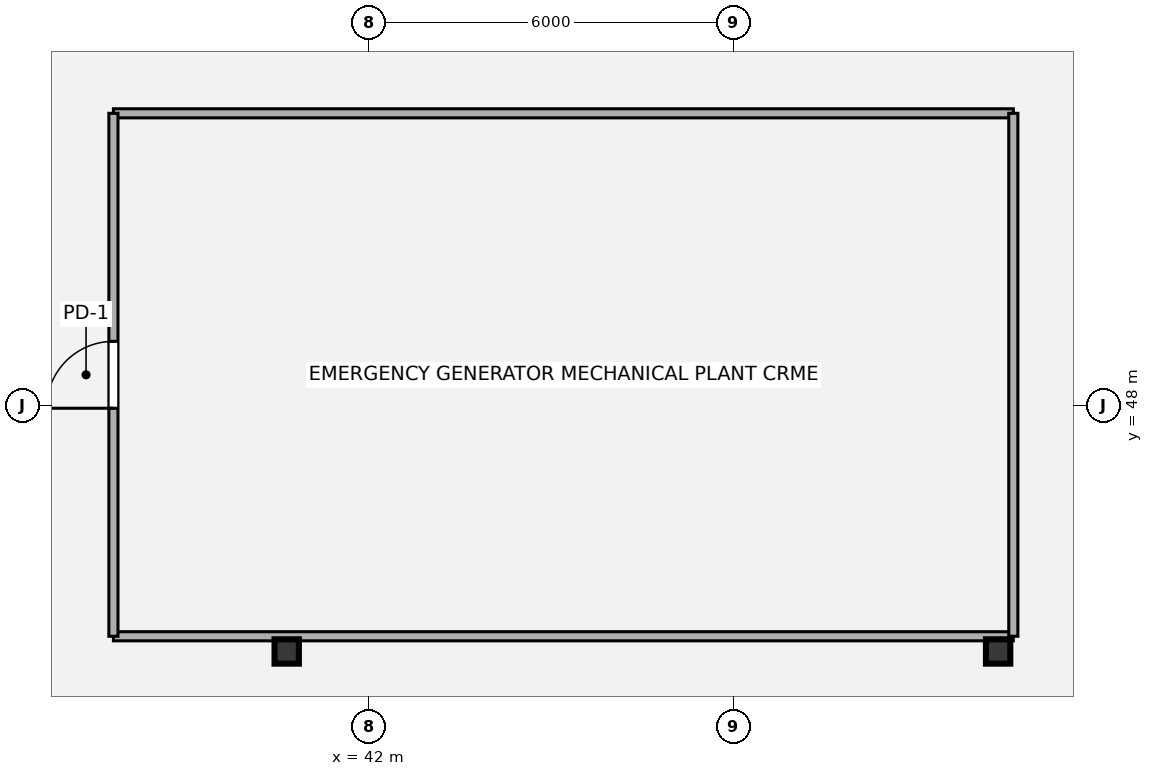
"""IFC4 building model, lengths in metres.
Left out: names, types, materials, properties, quantities, classifications, styles, units other than length and angle.
Written with IfcOpenShell. Run it as: python <this file> out.ifc"""

import sys

from ifc_helpers import new_model, si_unit, direction, frame, frame_2d, origin, origin_2d, place, context, subcontext, project, spatial, rectangle, hollow_rectangle, extrude, source, transform, mapped, element, fill, save


model = new_model("IFC4")
c1 = context("Model", 3, precision=1e-05, world=origin(), true_north=direction((0.0, 1.0)))
c2 = subcontext(c1, "Body", "Model", "MODEL_VIEW")
j1 = project(units=[si_unit("LENGTHUNIT", "METRE"), si_unit("PLANEANGLEUNIT", "RADIAN")], contexts=[c1])
p1 = place(None, origin())
s1 = spatial("IfcSite", under=j1, at=p1, CompositionType="ELEMENT")
p2 = place(p1, origin())
s2 = spatial("IfcBuilding", under=s1, at=p2, CompositionType="ELEMENT")
p3 = place(p2, frame((0.0, 0.0, 311.76)))
s3 = spatial("IfcBuildingStorey", under=s2, at=p3, CompositionType="ELEMENT", Elevation=311.76)
m1 = source(origin(), c2, "Body", "SweptSolid", [
    extrude(hollow_rectangle(XDim=0.4, YDim=0.4, WallThickness=0.02, OuterFilletRadius=0.04, at=origin_2d()), origin(), (0.0, 0.0, 1.0), 3.96),
])
for number, where, z_axis, x_axis in (
    (1, (52.35, 43.95, 0.0), (0.0, 0.0, 1.0), (1.0, 0.0, 0.0)),
    (2, (40.65, 43.95, 0.0), (0.0, 0.0, 1.0), (1.0, 0.0, 0.0)),
):
    element("IfcColumn", number, at=place(p3, frame(where, z_axis=z_axis, x_axis=x_axis)), inside=s3, PredefinedType="COLUMN", context=c2, shape_type="MappedRepresentation", body=[
        mapped(m1, transform((0.0, 0.0, 0.0), x_axis=(1.0, 0.0, 0.0), y_axis=(0.0, 1.0, 0.0), z_axis=(0.0, 0.0, 1.0), scale=1.0)),
    ])
p4 = place(p3, frame((53.8, 43.6, 0.0), z_axis=(0.0, 0.0, 1.0), x_axis=(-0.194979757801, -0.980807266515, 0.0)))
e3 = element("IfcWall", 3, at=p4, inside=s3, PredefinedType="SOLIDWALL", context=c2, shape_type="SweptSolid", body=[
    extrude(rectangle(XDim=0.702, YDim=0.195, at=frame_2d((0.351, 0.0))), origin(), (0.0, 0.0, 1.0), 3.71),
])
p5 = place(p3, frame((37.8, 44.2, 0.0), z_axis=(0.0, 0.0, 1.0), x_axis=(1.0, 0.0, 0.0)))
e4 = element("IfcWall", 4, at=p5, inside=s3, PredefinedType="PARTITIONING", context=c2, shape_type="SweptSolid", body=[
    extrude(rectangle(XDim=14.8, YDim=0.15, at=frame_2d((7.4, 0.0))), origin(), (0.0, 0.0, 1.0), 3.083),
])
p6 = place(p3, frame((37.8, 52.8, 0.0), z_axis=(0.0, 0.0, 1.0), x_axis=(1.0, 0.0, 0.0)))
e5 = element("IfcWall", 5, at=p6, inside=s3, PredefinedType="PARTITIONING", context=c2, shape_type="SweptSolid", body=[
    extrude(rectangle(XDim=14.8, YDim=0.15, at=frame_2d((7.4, 0.0))), origin(), (0.0, 0.0, 1.0), 3.162),
])
p7 = place(p3, frame((37.8, 44.2, 0.0), z_axis=(0.0, 0.0, 1.0), x_axis=(0.0, 1.0, 0.0)))
e6 = element("IfcWall", 6, at=p7, inside=s3, PredefinedType="PARTITIONING", context=c2, shape_type="SweptSolid", body=[
    extrude(rectangle(XDim=8.6, YDim=0.15, at=frame_2d((4.3, 0.0))), origin(), (0.0, 0.0, 1.0), 3.68),
])
p8 = place(p7, frame((3.75, 0.0, 0.0)))
e7 = element("IfcOpeningElement", 7, at=p8, cuts=e6, PredefinedType="OPENING", context=c2, shape_type="SweptSolid", body=[
    extrude(rectangle(XDim=1.1, YDim=2.1, at=origin_2d()), frame((0.55, 0.085, 1.05), z_axis=(0.0, -1.0, 0.0), x_axis=(1.0, 0.0, 0.0)), (0.0, 0.0, 1.0), 0.17),
])
p9 = place(p3, frame((52.6, 44.2, 0.0), z_axis=(0.0, 0.0, 1.0), x_axis=(0.0, 1.0, 0.0)))
e8 = element("IfcWall", 8, at=p9, inside=s3, PredefinedType="PARTITIONING", context=c2, shape_type="SweptSolid", body=[
    extrude(rectangle(XDim=8.6, YDim=0.15, at=frame_2d((4.3, 0.0))), origin(), (0.0, 0.0, 1.0), 2.995),
])
m2 = source(origin(), c2, "Body", "SweptSolid", [
    extrude(rectangle(XDim=1.1, YDim=2.1, at=origin_2d()), frame((0.55, 0.025, 1.05), z_axis=(0.0, -1.0, 0.0), x_axis=(1.0, 0.0, 0.0)), (0.0, 0.0, 1.0), 0.05),
])
p10 = place(p8, origin())
e9 = element("IfcDoor", 9, at=p10, inside=s3, OperationType="SINGLE_SWING_LEFT", PredefinedType="DOOR", context=c2, shape_type="MappedRepresentation", body=[
    mapped(m2, transform((0.0, 0.0, 0.0), x_axis=(1.0, 0.0, 0.0), y_axis=(0.0, 1.0, 0.0), z_axis=(0.0, 0.0, 1.0), scale=1.0)),
])
fill(e7, e9)
save(model, sys.argv[1])
